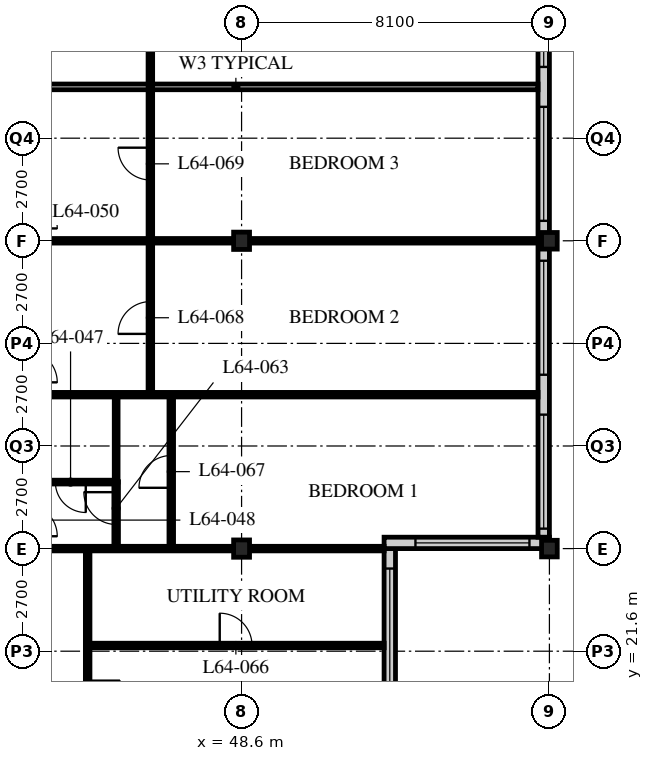
"""IFC4 building model, lengths in metres.
Left out: names, types, materials, properties, quantities, classifications, styles, units other than length and angle.
Written with IfcOpenShell. Run it as: python <this file> out.ifc"""

import sys

from ifc_helpers import new_model, si_unit, direction, frame, frame_2d, origin, origin_2d, place, context, subcontext, project, spatial, rectangle, i_section, extrude, element, fill, save


model = new_model("IFC4")
c1 = context("Model", 3, precision=1e-05, world=origin(), true_north=direction((0.0, 1.0)))
c2 = subcontext(c1, "Body", "Model", "MODEL_VIEW")
j1 = project(units=[si_unit("LENGTHUNIT", "METRE"), si_unit("PLANEANGLEUNIT", "RADIAN")], contexts=[c1])
p1 = place(None, origin())
s1 = spatial("IfcSite", under=j1, at=p1, CompositionType="ELEMENT")
p2 = place(p1, origin())
s2 = spatial("IfcBuilding", under=s1, at=p2, CompositionType="ELEMENT")
p3 = place(p2, frame((0.0, 0.0, 250.2)))
s3 = spatial("IfcBuildingStorey", under=s2, at=p3, CompositionType="ELEMENT", Elevation=250.2)
for number, where, z_axis, x_axis in (
    (1, (48.6, 24.3, 0.0), (0.0, 0.0, 1.0), (1.0, 0.0, 0.0)),
    (2, (48.6, 32.4, 0.0), (0.0, 0.0, 1.0), (1.0, 0.0, 0.0)),
):
    element("IfcColumn", number, at=place(p3, frame(where, z_axis=z_axis, x_axis=x_axis)), inside=s3, PredefinedType="COLUMN", context=c2, shape_type="SweptSolid", body=[
        extrude(i_section(OverallWidth=0.418, OverallDepth=0.456, WebThickness=0.042, FlangeThickness=0.067, FilletRadius=0.015, at=origin_2d()), origin(), (0.0, 0.0, 1.0), 3.9),
    ])
for number, where, z_axis, x_axis in (
    (3, (56.7, 24.3, 0.0), (0.0, 0.0, 1.0), (1.0, 0.0, 0.0)),
    (4, (56.7, 32.4, 0.0), (0.0, 0.0, 1.0), (1.0, 0.0, 0.0)),
):
    element("IfcColumn", number, at=place(p3, frame(where, z_axis=z_axis, x_axis=x_axis)), inside=s3, PredefinedType="COLUMN", context=c2, shape_type="SweptSolid", body=[
        extrude(i_section(OverallWidth=0.412, OverallDepth=0.437, WebThickness=0.036, FlangeThickness=0.058, FilletRadius=0.015, at=origin_2d()), origin(), (0.0, 0.0, 1.0), 3.9),
    ])
p4 = place(p3, frame((52.5, 20.55, 0.0), z_axis=(0.0, 0.0, 1.0), x_axis=(0.0, 1.0, 0.0)))
e5 = element("IfcWall", 5, at=p4, inside=s3, PredefinedType="SOLIDWALL", context=c2, shape_type="SweptSolid", body=[
    extrude(rectangle(XDim=3.75, YDim=0.3, at=frame_2d((1.875, 0.0))), origin(), (0.0, 0.0, 1.0), 3.69),
])
p5 = place(p4, frame((0.225, 0.0, 0.6)))
e6 = element("IfcOpeningElement", 6, at=p5, cuts=e5, PredefinedType="OPENING", context=c2, shape_type="SweptSolid", body=[
    extrude(rectangle(XDim=3.0, YDim=2.3, at=frame_2d((1.5, 1.15))), frame((0.0, 0.16, 0.0), z_axis=(0.0, -1.0, 0.0), x_axis=(1.0, 0.0, 0.0)), (0.0, 0.0, 1.0), 0.32),
])
p6 = place(p3, frame((52.35, 24.45, 0.0), z_axis=(0.0, 0.0, 1.0), x_axis=(1.0, 0.0, 0.0)))
e7 = element("IfcWall", 7, at=p6, inside=s3, PredefinedType="SOLIDWALL", context=c2, shape_type="SweptSolid", body=[
    extrude(rectangle(XDim=4.35, YDim=0.3, at=frame_2d((2.175, 0.0))), origin(), (0.0, 0.0, 1.0), 3.69),
])
p7 = place(p6, frame((0.825, 0.0, 0.6)))
e8 = element("IfcOpeningElement", 8, at=p7, cuts=e7, PredefinedType="OPENING", context=c2, shape_type="SweptSolid", body=[
    extrude(rectangle(XDim=3.0, YDim=2.3, at=frame_2d((1.5, 1.15))), frame((0.0, 0.16, 0.0), z_axis=(0.0, -1.0, 0.0), x_axis=(1.0, 0.0, 0.0)), (0.0, 0.0, 1.0), 0.32),
])
p8 = place(p3, frame((56.55, 24.6, 0.0), z_axis=(0.0, 0.0, 1.0), x_axis=(0.0, 1.0, 0.0)))
e9 = element("IfcWall", 9, at=p8, inside=s3, PredefinedType="SOLIDWALL", context=c2, shape_type="SweptSolid", body=[
    extrude(rectangle(XDim=32.1, YDim=0.3, at=frame_2d((16.05, 0.0))), origin(), (0.0, 0.0, 1.0), 3.69),
])
p9 = place(p8, frame((0.225, 0.0, 0.6)))
e10 = element("IfcOpeningElement", 10, at=p9, cuts=e9, PredefinedType="OPENING", context=c2, shape_type="SweptSolid", body=[
    extrude(rectangle(XDim=3.0, YDim=2.4, at=frame_2d((1.5, 1.2))), frame((0.0, 0.16, 0.0), z_axis=(0.0, -1.0, 0.0), x_axis=(1.0, 0.0, 0.0)), (0.0, 0.0, 1.0), 0.32),
])
p10 = place(p8, frame((4.275, 0.0, 0.6)))
e11 = element("IfcOpeningElement", 11, at=p10, cuts=e9, PredefinedType="OPENING", context=c2, shape_type="SweptSolid", body=[
    extrude(rectangle(XDim=3.0, YDim=2.4, at=frame_2d((1.5, 1.2))), frame((0.0, 0.16, 0.0), z_axis=(0.0, -1.0, 0.0), x_axis=(1.0, 0.0, 0.0)), (0.0, 0.0, 1.0), 0.32),
])
p11 = place(p8, frame((8.325, 0.0, 0.6)))
e12 = element("IfcOpeningElement", 12, at=p11, cuts=e9, PredefinedType="OPENING", context=c2, shape_type="SweptSolid", body=[
    extrude(rectangle(XDim=3.0, YDim=2.4, at=frame_2d((1.5, 1.2))), frame((0.0, 0.16, 0.0), z_axis=(0.0, -1.0, 0.0), x_axis=(1.0, 0.0, 0.0)), (0.0, 0.0, 1.0), 0.32),
])
p12 = place(p8, frame((12.375, 0.0, 0.6)))
e13 = element("IfcOpeningElement", 13, at=p12, cuts=e9, PredefinedType="OPENING", context=c2, shape_type="SweptSolid", body=[
    extrude(rectangle(XDim=3.0, YDim=2.4, at=frame_2d((1.5, 1.2))), frame((0.0, 0.16, 0.0), z_axis=(0.0, -1.0, 0.0), x_axis=(1.0, 0.0, 0.0)), (0.0, 0.0, 1.0), 0.32),
])
p13 = place(p8, frame((16.425, 0.0, 0.6)))
e14 = element("IfcOpeningElement", 14, at=p13, cuts=e9, PredefinedType="OPENING", context=c2, shape_type="SweptSolid", body=[
    extrude(rectangle(XDim=3.0, YDim=2.4, at=frame_2d((1.5, 1.2))), frame((0.0, 0.16, 0.0), z_axis=(0.0, -1.0, 0.0), x_axis=(1.0, 0.0, 0.0)), (0.0, 0.0, 1.0), 0.32),
])
p14 = place(p8, frame((20.475, 0.0, 0.6)))
e15 = element("IfcOpeningElement", 15, at=p14, cuts=e9, PredefinedType="OPENING", context=c2, shape_type="SweptSolid", body=[
    extrude(rectangle(XDim=3.0, YDim=2.4, at=frame_2d((1.5, 1.2))), frame((0.0, 0.16, 0.0), z_axis=(0.0, -1.0, 0.0), x_axis=(1.0, 0.0, 0.0)), (0.0, 0.0, 1.0), 0.32),
])
p15 = place(p8, frame((24.525, 0.0, 0.6)))
e16 = element("IfcOpeningElement", 16, at=p15, cuts=e9, PredefinedType="OPENING", context=c2, shape_type="SweptSolid", body=[
    extrude(rectangle(XDim=3.0, YDim=2.4, at=frame_2d((1.5, 1.2))), frame((0.0, 0.16, 0.0), z_axis=(0.0, -1.0, 0.0), x_axis=(1.0, 0.0, 0.0)), (0.0, 0.0, 1.0), 0.32),
])
p16 = place(p8, frame((28.575, 0.0, 0.6)))
e17 = element("IfcOpeningElement", 17, at=p16, cuts=e9, PredefinedType="OPENING", context=c2, shape_type="SweptSolid", body=[
    extrude(rectangle(XDim=3.0, YDim=2.4, at=frame_2d((1.5, 1.2))), frame((0.0, 0.16, 0.0), z_axis=(0.0, -1.0, 0.0), x_axis=(1.0, 0.0, 0.0)), (0.0, 0.0, 1.0), 0.32),
])
p17 = place(p3, frame((42.9, 24.3, 0.0), z_axis=(0.0, 0.0, 1.0), x_axis=(1.0, 0.0, 0.0)))
e18 = element("IfcWall", 18, at=p17, inside=s3, PredefinedType="PARTITIONING", context=c2, shape_type="SweptSolid", body=[
    extrude(rectangle(XDim=9.45, YDim=0.12, at=frame_2d((4.725, 0.0))), origin(), (0.0, 0.0, 1.0), 3.078),
])
p18 = place(p3, frame((40.5, 36.45, 0.0), z_axis=(0.0, 0.0, 1.0), x_axis=(1.0, 0.0, 0.0)))
e19 = element("IfcWall", 19, at=p18, inside=s3, PredefinedType="PARTITIONING", context=c2, shape_type="SweptSolid", body=[
    extrude(rectangle(XDim=15.9, YDim=0.15, at=frame_2d((7.95, 0.0))), origin(), (0.0, 0.0, 1.0), 3.69),
])
p19 = place(p3, frame((44.55, 16.5, 0.0), z_axis=(0.0, 0.0, 1.0), x_axis=(0.0, 1.0, 0.0)))
e20 = element("IfcWall", 20, at=p19, inside=s3, PredefinedType="PARTITIONING", context=c2, shape_type="SweptSolid", body=[
    extrude(rectangle(XDim=7.8, YDim=0.12, at=frame_2d((3.9, 0.0))), origin(), (0.0, 0.0, 1.0), 3.69),
])
p20 = place(p19, frame((3.475, 0.0, 0.0)))
e21 = element("IfcOpeningElement", 21, at=p20, cuts=e20, PredefinedType="OPENING", context=c2, shape_type="SweptSolid", body=[
    extrude(rectangle(XDim=0.85, YDim=2.1, at=frame_2d((0.425, 1.05))), frame((0.0, 0.07, 0.0), z_axis=(0.0, -1.0, 0.0), x_axis=(1.0, 0.0, 0.0)), (0.0, 0.0, 1.0), 0.14),
])
p21 = place(p3, frame((42.9, 26.05, 0.0), z_axis=(0.0, 0.0, 1.0), x_axis=(1.0, 0.0, 0.0)))
e22 = element("IfcWall", 22, at=p21, inside=s3, PredefinedType="PARTITIONING", context=c2, shape_type="SweptSolid", body=[
    extrude(rectangle(XDim=2.4, YDim=0.1, at=frame_2d((1.2, 0.0))), origin(), (0.0, 0.0, 1.0), 3.69),
])
p22 = place(p21, frame((0.8, 0.0, 0.0)))
e23 = element("IfcOpeningElement", 23, at=p22, cuts=e22, PredefinedType="OPENING", context=c2, shape_type="SweptSolid", body=[
    extrude(rectangle(XDim=0.8, YDim=2.1, at=frame_2d((0.4, 1.05))), frame((0.0, 0.06, 0.0), z_axis=(0.0, -1.0, 0.0), x_axis=(1.0, 0.0, 0.0)), (0.0, 0.0, 1.0), 0.12),
])
p23 = place(p3, frame((45.3, 26.05, 0.0), z_axis=(0.0, 0.0, 1.0), x_axis=(0.0, 1.0, 0.0)))
e24 = element("IfcWall", 24, at=p23, inside=s3, PredefinedType="PARTITIONING", context=c2, shape_type="SweptSolid", body=[
    extrude(rectangle(XDim=2.3, YDim=0.1, at=frame_2d((1.15, 0.0))), origin(), (0.0, 0.0, 1.0), 3.69),
])
p24 = place(p3, frame((42.9, 28.35, 0.0), z_axis=(0.0, 0.0, 1.0), x_axis=(1.0, 0.0, 0.0)))
e25 = element("IfcWall", 25, at=p24, inside=s3, PredefinedType="PARTITIONING", context=c2, shape_type="SweptSolid", body=[
    extrude(rectangle(XDim=13.5, YDim=0.12, at=frame_2d((6.75, 0.0))), origin(), (0.0, 0.0, 1.0), 3.69),
])
p25 = place(p3, frame((42.9, 32.4, 0.0), z_axis=(0.0, 0.0, 1.0), x_axis=(1.0, 0.0, 0.0)))
e26 = element("IfcWall", 26, at=p25, inside=s3, PredefinedType="PARTITIONING", context=c2, shape_type="SweptSolid", body=[
    extrude(rectangle(XDim=13.5, YDim=0.12, at=frame_2d((6.75, 0.0))), origin(), (0.0, 0.0, 1.0), 3.078),
])
p26 = place(p3, frame((45.3, 24.3, 0.0), z_axis=(0.0, 0.0, 1.0), x_axis=(0.0, 1.0, 0.0)))
e27 = element("IfcWall", 27, at=p26, inside=s3, PredefinedType="PARTITIONING", context=c2, shape_type="SweptSolid", body=[
    extrude(rectangle(XDim=1.76, YDim=0.12, at=frame_2d((0.88, 0.0))), origin(), (0.0, 0.0, 1.0), 3.69),
])
p27 = place(p26, frame((0.635, 0.0, 0.0)))
e28 = element("IfcOpeningElement", 28, at=p27, cuts=e27, PredefinedType="OPENING", context=c2, shape_type="SweptSolid", body=[
    extrude(rectangle(XDim=0.85, YDim=2.1, at=frame_2d((0.425, 1.05))), frame((0.0, 0.07, 0.0), z_axis=(0.0, -1.0, 0.0), x_axis=(1.0, 0.0, 0.0)), (0.0, 0.0, 1.0), 0.14),
])
p28 = place(p3, frame((44.55, 21.75, 0.0), z_axis=(0.0, 0.0, 1.0), x_axis=(1.0, 0.0, 0.0)))
e29 = element("IfcWall", 29, at=p28, inside=s3, PredefinedType="PARTITIONING", context=c2, shape_type="SweptSolid", body=[
    extrude(rectangle(XDim=7.8, YDim=0.12, at=frame_2d((3.9, 0.0))), origin(), (0.0, 0.0, 1.0), 3.69),
])
p29 = place(p28, frame((3.475, 0.0, 0.0)))
e30 = element("IfcOpeningElement", 30, at=p29, cuts=e29, PredefinedType="OPENING", context=c2, shape_type="SweptSolid", body=[
    extrude(rectangle(XDim=0.85, YDim=2.1, at=frame_2d((0.425, 1.05))), frame((0.0, 0.07, 0.0), z_axis=(0.0, -1.0, 0.0), x_axis=(1.0, 0.0, 0.0)), (0.0, 0.0, 1.0), 0.14),
])
p30 = place(p3, frame((46.75, 24.3, 0.0), z_axis=(0.0, 0.0, 1.0), x_axis=(0.0, 1.0, 0.0)))
e31 = element("IfcWall", 31, at=p30, inside=s3, PredefinedType="PARTITIONING", context=c2, shape_type="SweptSolid", body=[
    extrude(rectangle(XDim=4.05, YDim=0.12, at=frame_2d((2.025, 0.0))), origin(), (0.0, 0.0, 1.0), 3.69),
])
p31 = place(p30, frame((1.6, 0.0, 0.0)))
e32 = element("IfcOpeningElement", 32, at=p31, cuts=e31, PredefinedType="OPENING", context=c2, shape_type="SweptSolid", body=[
    extrude(rectangle(XDim=0.85, YDim=2.1, at=frame_2d((0.425, 1.05))), frame((0.0, 0.07, 0.0), z_axis=(0.0, -1.0, 0.0), x_axis=(1.0, 0.0, 0.0)), (0.0, 0.0, 1.0), 0.14),
])
p32 = place(p3, frame((46.2, 28.35, 0.0), z_axis=(0.0, 0.0, 1.0), x_axis=(0.0, 1.0, 0.0)))
e33 = element("IfcWall", 33, at=p32, inside=s3, PredefinedType="PARTITIONING", context=c2, shape_type="SweptSolid", body=[
    extrude(rectangle(XDim=16.2, YDim=0.12, at=frame_2d((8.1, 0.0))), origin(), (0.0, 0.0, 1.0), 3.69),
])
p33 = place(p32, frame((1.6, 0.0, 0.0)))
e34 = element("IfcOpeningElement", 34, at=p33, cuts=e33, PredefinedType="OPENING", context=c2, shape_type="SweptSolid", body=[
    extrude(rectangle(XDim=0.85, YDim=2.1, at=frame_2d((0.425, 1.05))), frame((0.0, 0.07, 0.0), z_axis=(0.0, -1.0, 0.0), x_axis=(1.0, 0.0, 0.0)), (0.0, 0.0, 1.0), 0.14),
])
p34 = place(p32, frame((5.65, 0.0, 0.0)))
e35 = element("IfcOpeningElement", 35, at=p34, cuts=e33, PredefinedType="OPENING", context=c2, shape_type="SweptSolid", body=[
    extrude(rectangle(XDim=0.85, YDim=2.1, at=frame_2d((0.425, 1.05))), frame((0.0, 0.07, 0.0), z_axis=(0.0, -1.0, 0.0), x_axis=(1.0, 0.0, 0.0)), (0.0, 0.0, 1.0), 0.14),
])
p35 = place(p32, frame((13.75, 0.0, 0.0)))
e36 = element("IfcOpeningElement", 36, at=p35, cuts=e33, PredefinedType="OPENING", context=c2, shape_type="SweptSolid", body=[
    extrude(rectangle(XDim=0.85, YDim=2.1, at=frame_2d((0.425, 1.05))), frame((0.0, 0.07, 0.0), z_axis=(0.0, -1.0, 0.0), x_axis=(1.0, 0.0, 0.0)), (0.0, 0.0, 1.0), 0.14),
])
p36 = place(p32, frame((9.7, 0.0, 0.0)))
e37 = element("IfcOpeningElement", 37, at=p36, cuts=e33, PredefinedType="OPENING", context=c2, shape_type="SweptSolid", body=[
    extrude(rectangle(XDim=0.85, YDim=2.1, at=frame_2d((0.425, 1.05))), frame((0.0, 0.07, 0.0), z_axis=(0.0, -1.0, 0.0), x_axis=(1.0, 0.0, 0.0)), (0.0, 0.0, 1.0), 0.14),
])
p37 = place(p5, origin())
e38 = element("IfcWindow", 38, at=p37, inside=s3, PartitioningType="SINGLE_PANEL", PredefinedType="WINDOW", context=c2, shape_type="SweptSolid", body=[
    extrude(rectangle(XDim=3.0, YDim=2.3, at=frame_2d((1.5, 1.15))), frame((0.0, 0.03, 0.0), z_axis=(0.0, -1.0, 0.0), x_axis=(1.0, 0.0, 0.0)), (0.0, 0.0, 1.0), 0.06),
])
fill(e6, e38)
p38 = place(p7, origin())
e39 = element("IfcWindow", 39, at=p38, inside=s3, PartitioningType="SINGLE_PANEL", PredefinedType="WINDOW", context=c2, shape_type="SweptSolid", body=[
    extrude(rectangle(XDim=3.0, YDim=2.3, at=frame_2d((1.5, 1.15))), frame((0.0, 0.03, 0.0), z_axis=(0.0, -1.0, 0.0), x_axis=(1.0, 0.0, 0.0)), (0.0, 0.0, 1.0), 0.06),
])
fill(e8, e39)
p39 = place(p9, origin())
e40 = element("IfcWindow", 40, at=p39, inside=s3, PartitioningType="SINGLE_PANEL", PredefinedType="WINDOW", context=c2, shape_type="SweptSolid", body=[
    extrude(rectangle(XDim=3.0, YDim=2.4, at=frame_2d((1.5, 1.2))), frame((0.0, 0.03, 0.0), z_axis=(0.0, -1.0, 0.0), x_axis=(1.0, 0.0, 0.0)), (0.0, 0.0, 1.0), 0.06),
])
fill(e10, e40)
p40 = place(p10, origin())
e41 = element("IfcWindow", 41, at=p40, inside=s3, PartitioningType="SINGLE_PANEL", PredefinedType="WINDOW", context=c2, shape_type="SweptSolid", body=[
    extrude(rectangle(XDim=3.0, YDim=2.4, at=frame_2d((1.5, 1.2))), frame((0.0, 0.03, 0.0), z_axis=(0.0, -1.0, 0.0), x_axis=(1.0, 0.0, 0.0)), (0.0, 0.0, 1.0), 0.06),
])
fill(e11, e41)
p41 = place(p11, origin())
e42 = element("IfcWindow", 42, at=p41, inside=s3, PartitioningType="SINGLE_PANEL", PredefinedType="WINDOW", context=c2, shape_type="SweptSolid", body=[
    extrude(rectangle(XDim=3.0, YDim=2.4, at=frame_2d((1.5, 1.2))), frame((0.0, 0.03, 0.0), z_axis=(0.0, -1.0, 0.0), x_axis=(1.0, 0.0, 0.0)), (0.0, 0.0, 1.0), 0.06),
])
fill(e12, e42)
p42 = place(p12, origin())
e43 = element("IfcWindow", 43, at=p42, inside=s3, PartitioningType="SINGLE_PANEL", PredefinedType="WINDOW", context=c2, shape_type="SweptSolid", body=[
    extrude(rectangle(XDim=3.0, YDim=2.4, at=frame_2d((1.5, 1.2))), frame((0.0, 0.03, 0.0), z_axis=(0.0, -1.0, 0.0), x_axis=(1.0, 0.0, 0.0)), (0.0, 0.0, 1.0), 0.06),
])
fill(e13, e43)
p43 = place(p20, origin())
e44 = element("IfcDoor", 44, at=p43, inside=s3, OperationType="SINGLE_SWING_LEFT", PredefinedType="DOOR", context=c2, shape_type="SweptSolid", body=[
    extrude(rectangle(XDim=0.85, YDim=2.1, at=frame_2d((0.425, 1.05))), frame((0.0, 0.025, 0.0), z_axis=(0.0, -1.0, 0.0), x_axis=(1.0, 0.0, 0.0)), (0.0, 0.0, 1.0), 0.05),
])
fill(e21, e44)
p44 = place(p22, origin())
e45 = element("IfcDoor", 45, at=p44, inside=s3, OperationType="SINGLE_SWING_LEFT", PredefinedType="DOOR", context=c2, shape_type="SweptSolid", body=[
    extrude(rectangle(XDim=0.8, YDim=2.1, at=frame_2d((0.4, 1.05))), frame((0.0, 0.025, 0.0), z_axis=(0.0, -1.0, 0.0), x_axis=(1.0, 0.0, 0.0)), (0.0, 0.0, 1.0), 0.05),
])
fill(e23, e45)
p45 = place(p27, origin())
e46 = element("IfcDoor", 46, at=p45, inside=s3, OperationType="SINGLE_SWING_RIGHT", PredefinedType="DOOR", context=c2, shape_type="SweptSolid", body=[
    extrude(rectangle(XDim=0.85, YDim=2.1, at=frame_2d((0.425, 1.05))), frame((0.0, 0.025, 0.0), z_axis=(0.0, -1.0, 0.0), x_axis=(1.0, 0.0, 0.0)), (0.0, 0.0, 1.0), 0.05),
])
fill(e28, e46)
p46 = place(p29, origin())
e47 = element("IfcDoor", 47, at=p46, inside=s3, OperationType="SINGLE_SWING_LEFT", PredefinedType="DOOR", context=c2, shape_type="SweptSolid", body=[
    extrude(rectangle(XDim=0.85, YDim=2.1, at=frame_2d((0.425, 1.05))), frame((0.0, 0.025, 0.0), z_axis=(0.0, -1.0, 0.0), x_axis=(1.0, 0.0, 0.0)), (0.0, 0.0, 1.0), 0.05),
])
fill(e30, e47)
p47 = place(p31, origin())
e48 = element("IfcDoor", 48, at=p47, inside=s3, OperationType="SINGLE_SWING_LEFT", PredefinedType="DOOR", context=c2, shape_type="SweptSolid", body=[
    extrude(rectangle(XDim=0.85, YDim=2.1, at=frame_2d((0.425, 1.05))), frame((0.0, 0.025, 0.0), z_axis=(0.0, -1.0, 0.0), x_axis=(1.0, 0.0, 0.0)), (0.0, 0.0, 1.0), 0.05),
])
fill(e32, e48)
p48 = place(p33, origin())
e49 = element("IfcDoor", 49, at=p48, inside=s3, OperationType="SINGLE_SWING_LEFT", PredefinedType="DOOR", context=c2, shape_type="SweptSolid", body=[
    extrude(rectangle(XDim=0.85, YDim=2.1, at=frame_2d((0.425, 1.05))), frame((0.0, 0.025, 0.0), z_axis=(0.0, -1.0, 0.0), x_axis=(1.0, 0.0, 0.0)), (0.0, 0.0, 1.0), 0.05),
])
fill(e34, e49)
p49 = place(p34, origin())
e50 = element("IfcDoor", 50, at=p49, inside=s3, OperationType="SINGLE_SWING_RIGHT", PredefinedType="DOOR", context=c2, shape_type="SweptSolid", body=[
    extrude(rectangle(XDim=0.85, YDim=2.1, at=frame_2d((0.425, 1.05))), frame((0.0, 0.025, 0.0), z_axis=(0.0, -1.0, 0.0), x_axis=(1.0, 0.0, 0.0)), (0.0, 0.0, 1.0), 0.05),
])
fill(e35, e50)
save(model, sys.argv[1])
